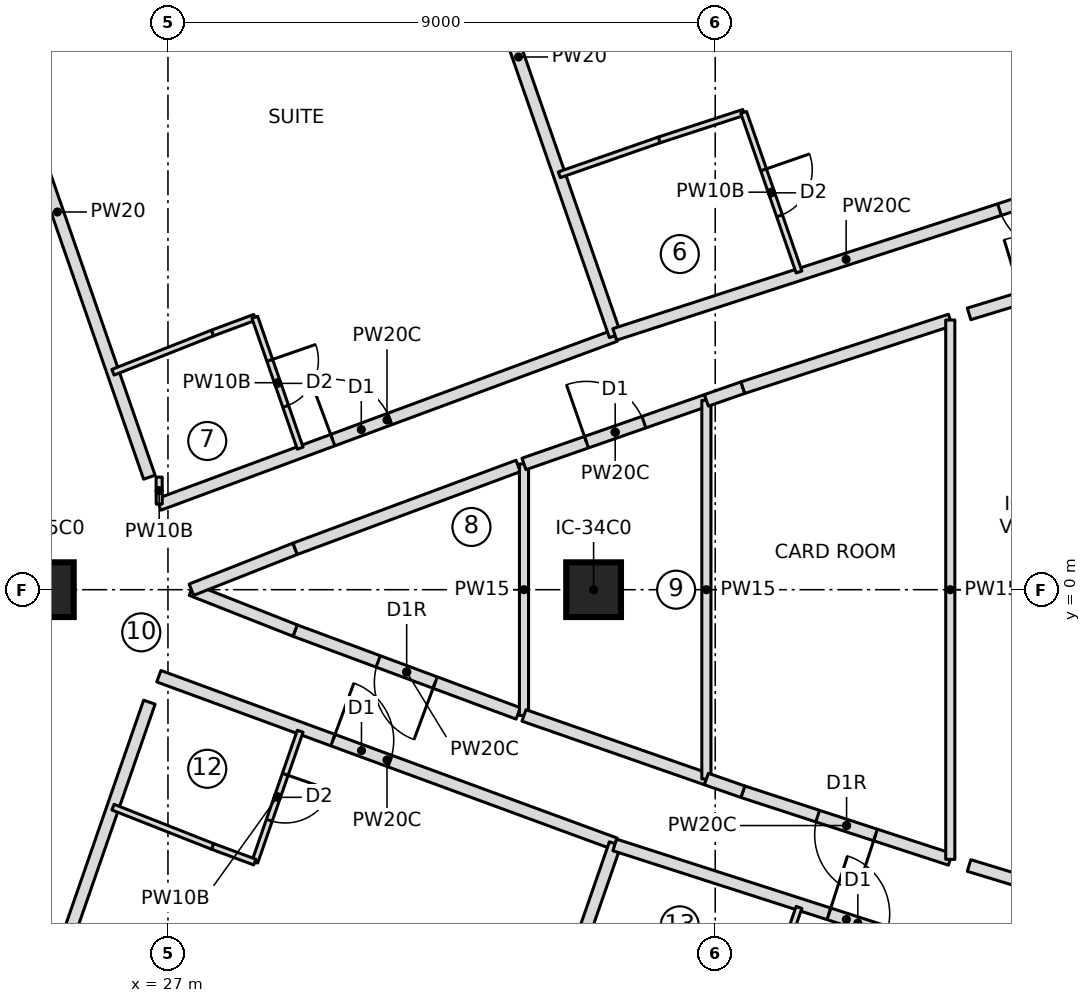
"""IFC4 building model, lengths in metres.
Left out: names, types, materials, properties, quantities, classifications, styles, units other than length and angle.
Written with IfcOpenShell. Run it as: python <this file> out.ifc"""

import sys

from ifc_helpers import new_model, si_unit, direction, frame, frame_2d, origin, origin_2d, place, context, subcontext, project, spatial, rectangle, extrude, element, fill, save


model = new_model("IFC4")
c1 = context("Model", 3, precision=1e-05, world=origin(), true_north=direction((0.0, 1.0)))
c2 = subcontext(c1, "Body", "Model", "MODEL_VIEW")
j1 = project(units=[si_unit("LENGTHUNIT", "METRE"), si_unit("PLANEANGLEUNIT", "RADIAN")], contexts=[c1])
p1 = place(None, origin())
s1 = spatial("IfcSite", under=j1, at=p1, CompositionType="ELEMENT")
p2 = place(p1, origin())
s2 = spatial("IfcBuilding", under=s1, at=p2, CompositionType="ELEMENT")
p3 = place(p2, frame((0.0, 0.0, 299.85)))
s3 = spatial("IfcBuildingStorey", under=s2, at=p3, CompositionType="ELEMENT", Elevation=299.85)
for number, where, z_axis, x_axis in (
    (1, (25.0, 0.0, 0.0), (0.0, 0.0, 1.0), (1.0, 0.0, 0.0)),
    (2, (34.0, 0.0, 0.0), (0.0, 0.0, 1.0), (1.0, 0.0, 0.0)),
):
    element("IfcColumn", number, at=place(p3, frame(where, z_axis=z_axis, x_axis=x_axis)), inside=s3, PredefinedType="COLUMN", context=c2, shape_type="SweptSolid", body=[
        extrude(rectangle(XDim=0.9, YDim=0.9, at=origin_2d()), origin(), (0.0, 0.0, 1.0), 3.55),
    ])
p4 = place(p3, frame((26.694, 1.85, 0.0), z_axis=(0.0, 0.0, 1.0), x_axis=(-0.327714422317, 0.944776829418, 0.0)))
e3 = element("IfcWall", 3, at=p4, inside=s3, PredefinedType="PARTITIONING", context=c2, shape_type="SweptSolid", body=[
    extrude(rectangle(XDim=9.233, YDim=0.2, at=frame_2d((4.617, 0.0))), origin(), (0.0, 0.0, 1.0), 3.15),
])
p5 = place(p3, frame((26.85, 1.401, 0.0), z_axis=(0.0, 0.0, 1.0), x_axis=(0.937815361849, 0.34713447982, 0.0)))
e4 = element("IfcWall", 4, at=p5, inside=s3, PredefinedType="PARTITIONING", context=c2, shape_type="SweptSolid", body=[
    extrude(rectangle(XDim=8.001, YDim=0.2, at=frame_2d((4.001, 0.0))), origin(), (0.0, 0.0, 1.0), 3.15),
])
p6 = place(p5, frame((3.05, 0.0, 0.0)))
e5 = element("IfcOpeningElement", 5, at=p6, cuts=e4, PredefinedType="OPENING", context=c2, shape_type="SweptSolid", body=[
    extrude(rectangle(XDim=1.0, YDim=2.1, at=frame_2d((0.5, 1.05))), frame((0.0, 0.11, 0.0), z_axis=(0.0, -1.0, 0.0), x_axis=(1.0, 0.0, 0.0)), (0.0, 0.0, 1.0), 0.22),
])
p7 = place(p3, frame((26.096, 3.576, 0.0), z_axis=(0.0, 0.0, 1.0), x_axis=(0.930254925629, 0.366913850028, 0.0)))
e6 = element("IfcWall", 6, at=p7, inside=s3, PredefinedType="PARTITIONING", context=c2, shape_type="SweptSolid", body=[
    extrude(rectangle(XDim=1.76, YDim=0.1, at=frame_2d((0.88, 0.0))), origin(), (0.0, 0.0, 1.0), 3.15),
])
p8 = place(p3, frame((27.733, 4.222, 0.0), z_axis=(0.0, 0.0, 1.0), x_axis=(0.937514267289, 0.347946833049, 0.0)))
e7 = element("IfcWall", 7, at=p8, inside=s3, PredefinedType="PARTITIONING", context=c2, shape_type="SweptSolid", body=[
    extrude(rectangle(XDim=0.742, YDim=0.1, at=frame_2d((0.371, 0.0))), origin(), (0.0, 0.0, 1.0), 3.15),
])
p9 = place(p3, frame((28.428, 4.48, 0.0), z_axis=(0.0, 0.0, 1.0), x_axis=(0.327718024288, -0.944775579996, 0.0)))
e8 = element("IfcWall", 8, at=p9, inside=s3, PredefinedType="PARTITIONING", context=c2, shape_type="SweptSolid", body=[
    extrude(rectangle(XDim=2.277, YDim=0.1, at=frame_2d((1.139, 0.0))), origin(), (0.0, 0.0, 1.0), 3.15),
])
p10 = place(p9, frame((0.75, 0.0, 0.0)))
e9 = element("IfcOpeningElement", 9, at=p10, cuts=e8, PredefinedType="OPENING", context=c2, shape_type="SweptSolid", body=[
    extrude(rectangle(XDim=0.8, YDim=2.1, at=frame_2d((0.4, 1.05))), frame((0.0, 0.06, 0.0), z_axis=(0.0, -1.0, 0.0), x_axis=(1.0, 0.0, 0.0)), (0.0, 0.0, 1.0), 0.12),
])
p11 = place(p3, frame((34.354, 4.179, 0.0), z_axis=(0.0, 0.0, 1.0), x_axis=(-0.327696596093, 0.944783012606, 0.0)))
e10 = element("IfcWall", 10, at=p11, inside=s3, PredefinedType="PARTITIONING", context=c2, shape_type="SweptSolid", body=[
    extrude(rectangle(XDim=9.7, YDim=0.2, at=frame_2d((4.85, 0.0))), origin(), (0.0, 0.0, 1.0), 3.15),
])
p12 = place(p3, frame((41.958, 6.667, 0.0), z_axis=(0.0, 0.0, 1.0), x_axis=(-0.95118530316, -0.308620347761, 0.0)))
e11 = element("IfcWall", 11, at=p12, inside=s3, PredefinedType="PARTITIONING", context=c2, shape_type="SweptSolid", body=[
    extrude(rectangle(XDim=8.002, YDim=0.2, at=frame_2d((4.001, 0.0))), origin(), (0.0, 0.0, 1.0), 3.15),
])
p13 = place(p12, frame((0.35, 0.0, 0.0)))
e12 = element("IfcOpeningElement", 12, at=p13, cuts=e11, PredefinedType="OPENING", context=c2, shape_type="SweptSolid", body=[
    extrude(rectangle(XDim=1.0, YDim=2.1, at=frame_2d((0.5, 1.05))), frame((0.0, 0.11, 0.0), z_axis=(0.0, -1.0, 0.0), x_axis=(1.0, 0.0, 0.0)), (0.0, 0.0, 1.0), 0.22),
])
p14 = place(p3, frame((33.437, 6.824, 0.0), z_axis=(0.0, 0.0, 1.0), x_axis=(0.944260018318, 0.329200573825, 0.0)))
e13 = element("IfcWall", 13, at=p14, inside=s3, PredefinedType="PARTITIONING", context=c2, shape_type="SweptSolid", body=[
    extrude(rectangle(XDim=1.74, YDim=0.1, at=frame_2d((0.87, 0.0))), origin(), (0.0, 0.0, 1.0), 3.15),
])
p15 = place(p3, frame((35.08, 7.397, 0.0), z_axis=(0.0, 0.0, 1.0), x_axis=(0.95070411494, 0.310099477322, 0.0)))
e14 = element("IfcWall", 14, at=p15, inside=s3, PredefinedType="PARTITIONING", context=c2, shape_type="SweptSolid", body=[
    extrude(rectangle(XDim=1.46, YDim=0.1, at=frame_2d((0.73, 0.0))), origin(), (0.0, 0.0, 1.0), 3.15),
])
p16 = place(p3, frame((36.468, 7.85, 0.0), z_axis=(0.0, 0.0, 1.0), x_axis=(0.327702248101, -0.944781052197, 0.0)))
e15 = element("IfcWall", 15, at=p16, inside=s3, PredefinedType="PARTITIONING", context=c2, shape_type="SweptSolid", body=[
    extrude(rectangle(XDim=2.777, YDim=0.1, at=frame_2d((1.389, 0.0))), origin(), (0.0, 0.0, 1.0), 3.15),
])
p17 = place(p16, frame((1.0, 0.0, 0.0)))
e16 = element("IfcOpeningElement", 16, at=p17, cuts=e15, PredefinedType="OPENING", context=c2, shape_type="SweptSolid", body=[
    extrude(rectangle(XDim=0.8, YDim=2.1, at=frame_2d((0.4, 1.05))), frame((0.0, 0.06, 0.0), z_axis=(0.0, -1.0, 0.0), x_axis=(1.0, 0.0, 0.0)), (0.0, 0.0, 1.0), 0.12),
])
p18 = place(p3, frame((41.965, 6.648, 0.0), z_axis=(0.0, 0.0, 1.0), x_axis=(-0.327710853631, 0.944778067279, 0.0)))
e17 = element("IfcWall", 17, at=p18, inside=s3, PredefinedType="PARTITIONING", context=c2, shape_type="SweptSolid", body=[
    extrude(rectangle(XDim=9.707, YDim=0.2, at=frame_2d((4.854, 0.0))), origin(), (0.0, 0.0, 1.0), 3.15),
])
p19 = place(p3, frame((23.668, -10.573, 0.0), z_axis=(0.0, 0.0, 1.0), x_axis=(0.327714422317, 0.944776829418, 0.0)))
e18 = element("IfcWall", 18, at=p19, inside=s3, PredefinedType="PARTITIONING", context=c2, shape_type="SweptSolid", body=[
    extrude(rectangle(XDim=9.233, YDim=0.2, at=frame_2d((4.617, 0.0))), origin(), (0.0, 0.0, 1.0), 3.15),
])
p20 = place(p3, frame((26.85, -1.423, 0.0), z_axis=(0.0, 0.0, 1.0), x_axis=(0.938687309179, -0.344769684843, 0.0)))
e19 = element("IfcWall", 19, at=p20, inside=s3, PredefinedType="PARTITIONING", context=c2, shape_type="SweptSolid", body=[
    extrude(rectangle(XDim=7.994, YDim=0.2, at=frame_2d((3.997, 0.0))), origin(), (0.0, 0.0, 1.0), 3.15),
])
p21 = place(p20, frame((3.05, 0.0, 0.0)))
e20 = element("IfcOpeningElement", 20, at=p21, cuts=e19, PredefinedType="OPENING", context=c2, shape_type="SweptSolid", body=[
    extrude(rectangle(XDim=1.0, YDim=2.1, at=frame_2d((0.5, 1.05))), frame((0.0, 0.11, 0.0), z_axis=(0.0, -1.0, 0.0), x_axis=(1.0, 0.0, 0.0)), (0.0, 0.0, 1.0), 0.22),
])
p22 = place(p3, frame((29.175, -2.328, 0.0), z_axis=(0.0, 0.0, 1.0), x_axis=(-0.327718024288, -0.944775579996, 0.0)))
e21 = element("IfcWall", 21, at=p22, inside=s3, PredefinedType="PARTITIONING", context=c2, shape_type="SweptSolid", body=[
    extrude(rectangle(XDim=2.277, YDim=0.1, at=frame_2d((1.139, 0.0))), origin(), (0.0, 0.0, 1.0), 3.15),
])
p23 = place(p22, frame((0.75, 0.0, 0.0)))
e22 = element("IfcOpeningElement", 22, at=p23, cuts=e21, PredefinedType="OPENING", context=c2, shape_type="SweptSolid", body=[
    extrude(rectangle(XDim=0.8, YDim=2.1, at=frame_2d((0.4, 1.05))), frame((0.0, 0.06, 0.0), z_axis=(0.0, -1.0, 0.0), x_axis=(1.0, 0.0, 0.0)), (0.0, 0.0, 1.0), 0.12),
])
p24 = place(p3, frame((28.428, -4.48, 0.0), z_axis=(0.0, 0.0, 1.0), x_axis=(-0.937514267289, 0.347946833049, 0.0)))
e23 = element("IfcWall", 23, at=p24, inside=s3, PredefinedType="PARTITIONING", context=c2, shape_type="SweptSolid", body=[
    extrude(rectangle(XDim=0.742, YDim=0.1, at=frame_2d((0.371, 0.0))), origin(), (0.0, 0.0, 1.0), 3.15),
])
p25 = place(p3, frame((27.733, -4.222, 0.0), z_axis=(0.0, 0.0, 1.0), x_axis=(-0.930254925629, 0.366913850028, 0.0)))
e24 = element("IfcWall", 24, at=p25, inside=s3, PredefinedType="PARTITIONING", context=c2, shape_type="SweptSolid", body=[
    extrude(rectangle(XDim=1.76, YDim=0.1, at=frame_2d((0.88, 0.0))), origin(), (0.0, 0.0, 1.0), 3.15),
])
p26 = place(p3, frame((31.175, -13.344, 0.0), z_axis=(0.0, 0.0, 1.0), x_axis=(0.327696596093, 0.944783012606, 0.0)))
e25 = element("IfcWall", 25, at=p26, inside=s3, PredefinedType="PARTITIONING", context=c2, shape_type="SweptSolid", body=[
    extrude(rectangle(XDim=9.7, YDim=0.2, at=frame_2d((4.85, 0.0))), origin(), (0.0, 0.0, 1.0), 3.15),
])
p27 = place(p3, frame((34.347, -4.198, 0.0), z_axis=(0.0, 0.0, 1.0), x_axis=(0.951959334907, -0.306224467805, 0.0)))
e26 = element("IfcWall", 26, at=p27, inside=s3, PredefinedType="PARTITIONING", context=c2, shape_type="SweptSolid", body=[
    extrude(rectangle(XDim=8.002, YDim=0.2, at=frame_2d((4.001, 0.0))), origin(), (0.0, 0.0, 1.0), 3.15),
])
p28 = place(p27, frame((3.7, 0.0, 0.0)))
e27 = element("IfcOpeningElement", 27, at=p28, cuts=e26, PredefinedType="OPENING", context=c2, shape_type="SweptSolid", body=[
    extrude(rectangle(XDim=1.0, YDim=2.1, at=frame_2d((0.5, 1.05))), frame((0.0, 0.11, 0.0), z_axis=(0.0, -1.0, 0.0), x_axis=(1.0, 0.0, 0.0)), (0.0, 0.0, 1.0), 0.22),
])
p29 = place(p3, frame((37.378, -5.226, 0.0), z_axis=(0.0, 0.0, 1.0), x_axis=(-0.327702248101, -0.944781052197, 0.0)))
e28 = element("IfcWall", 28, at=p29, inside=s3, PredefinedType="PARTITIONING", context=c2, shape_type="SweptSolid", body=[
    extrude(rectangle(XDim=2.777, YDim=0.1, at=frame_2d((1.389, 0.0))), origin(), (0.0, 0.0, 1.0), 3.15),
])
p30 = place(p29, frame((1.0, 0.0, 0.0)))
e29 = element("IfcOpeningElement", 29, at=p30, cuts=e28, PredefinedType="OPENING", context=c2, shape_type="SweptSolid", body=[
    extrude(rectangle(XDim=0.8, YDim=2.1, at=frame_2d((0.4, 1.05))), frame((0.0, 0.06, 0.0), z_axis=(0.0, -1.0, 0.0), x_axis=(1.0, 0.0, 0.0)), (0.0, 0.0, 1.0), 0.12),
])
p31 = place(p3, frame((32.76, -2.035, 0.0), z_axis=(0.0, 0.0, 1.0), x_axis=(-0.937460178932, 0.348092534992, 0.0)))
e30 = element("IfcWall", 30, at=p31, inside=s3, PredefinedType="PARTITIONING", context=c2, shape_type="SweptSolid", body=[
    extrude(rectangle(XDim=3.913, YDim=0.2, at=frame_2d((1.957, 0.0))), origin(), (0.0, 0.0, 1.0), 3.15),
])
p32 = place(p31, frame((1.457, 0.0, 0.0)))
e31 = element("IfcOpeningElement", 31, at=p32, cuts=e30, PredefinedType="OPENING", context=c2, shape_type="SweptSolid", body=[
    extrude(rectangle(XDim=1.0, YDim=2.1, at=frame_2d((0.5, 1.05))), frame((0.0, 0.11, 0.0), z_axis=(0.0, -1.0, 0.0), x_axis=(1.0, 0.0, 0.0)), (0.0, 0.0, 1.0), 0.22),
])
for number, where, z_axis, x_axis in (
    (32, (29.092, -0.673, 0.0), (0.0, 0.0, 1.0), (-0.93, 0.367, 0.0)),
    (33, (27.385, 0.0, 0.0), (0.0, 0.0, 1.0), (0.93, 0.367, 0.0)),
):
    element("IfcWall", number, at=place(p3, frame(where, z_axis=z_axis, x_axis=x_axis)), inside=s3, PredefinedType="PARTITIONING", context=c2, shape_type="SweptSolid", body=[
        extrude(rectangle(XDim=1.834, YDim=0.2, at=frame_2d((0.917, 0.0))), origin(), (0.0, 0.0, 1.0), 3.15),
    ])
p33 = place(p3, frame((29.092, 0.673, 0.0), z_axis=(0.0, 0.0, 1.0), x_axis=(0.937460178932, 0.348092534992, 0.0)))
e34 = element("IfcWall", 34, at=p33, inside=s3, PredefinedType="PARTITIONING", context=c2, shape_type="SweptSolid", body=[
    extrude(rectangle(XDim=3.913, YDim=0.2, at=frame_2d((1.957, 0.0))), origin(), (0.0, 0.0, 1.0), 3.15),
])
p34 = place(p3, frame((32.855, -2.068, 0.0), z_axis=(0.0, 0.0, 1.0), x_axis=(0.0, 1.0, 0.0)))
e35 = element("IfcWall", 35, at=p34, inside=s3, PredefinedType="PARTITIONING", context=c2, shape_type="SweptSolid", body=[
    extrude(rectangle(XDim=4.136, YDim=0.15, at=frame_2d((2.068, 0.0))), origin(), (0.0, 0.0, 1.0), 3.15),
])
p35 = place(p3, frame((32.855, 2.068, 0.0), z_axis=(0.0, 0.0, 1.0), x_axis=(0.944260188635, 0.329200085296, 0.0)))
e36 = element("IfcWall", 36, at=p35, inside=s3, PredefinedType="PARTITIONING", context=c2, shape_type="SweptSolid", body=[
    extrude(rectangle(XDim=3.177, YDim=0.2, at=frame_2d((1.588, 0.0))), origin(), (0.0, 0.0, 1.0), 3.15),
])
p36 = place(p35, frame((1.088, 0.0, 0.0)))
e37 = element("IfcOpeningElement", 37, at=p36, cuts=e36, PredefinedType="OPENING", context=c2, shape_type="SweptSolid", body=[
    extrude(rectangle(XDim=1.0, YDim=2.1, at=frame_2d((0.5, 1.05))), frame((0.0, 0.11, 0.0), z_axis=(0.0, -1.0, 0.0), x_axis=(1.0, 0.0, 0.0)), (0.0, 0.0, 1.0), 0.22),
])
p37 = place(p3, frame((35.855, -3.114, 0.0), z_axis=(0.0, 0.0, 1.0), x_axis=(-0.944260188635, 0.329200085296, 0.0)))
e38 = element("IfcWall", 38, at=p37, inside=s3, PredefinedType="PARTITIONING", context=c2, shape_type="SweptSolid", body=[
    extrude(rectangle(XDim=3.177, YDim=0.2, at=frame_2d((1.588, 0.0))), origin(), (0.0, 0.0, 1.0), 3.15),
])
p38 = place(p3, frame((35.855, -3.114, 0.0), z_axis=(0.0, 0.0, 1.0), x_axis=(0.0, 1.0, 0.0)))
e39 = element("IfcWall", 39, at=p38, inside=s3, PredefinedType="PARTITIONING", context=c2, shape_type="SweptSolid", body=[
    extrude(rectangle(XDim=6.228, YDim=0.15, at=frame_2d((3.114, 0.0))), origin(), (0.0, 0.0, 1.0), 3.15),
])
p39 = place(p3, frame((39.866, -4.435, 0.0), z_axis=(0.0, 0.0, 1.0), x_axis=(-0.950718067733, 0.310056697535, 0.0)))
e40 = element("IfcWall", 40, at=p39, inside=s3, PredefinedType="PARTITIONING", context=c2, shape_type="SweptSolid", body=[
    extrude(rectangle(XDim=3.588, YDim=0.2, at=frame_2d((1.794, 0.0))), origin(), (0.0, 0.0, 1.0), 3.15),
])
p40 = place(p39, frame((1.294, 0.0, 0.0)))
e41 = element("IfcOpeningElement", 41, at=p40, cuts=e40, PredefinedType="OPENING", context=c2, shape_type="SweptSolid", body=[
    extrude(rectangle(XDim=1.0, YDim=2.1, at=frame_2d((0.5, 1.05))), frame((0.0, 0.11, 0.0), z_axis=(0.0, -1.0, 0.0), x_axis=(1.0, 0.0, 0.0)), (0.0, 0.0, 1.0), 0.22),
])
for number, where, z_axis, x_axis in (
    (42, (36.455, -3.323, 0.0), (0.0, 0.0, 1.0), (-0.944, 0.329, 0.0)),
    (43, (35.855, 3.114, 0.0), (0.0, 0.0, 1.0), (0.944, 0.329, 0.0)),
):
    element("IfcWall", number, at=place(p3, frame(where, z_axis=z_axis, x_axis=x_axis)), inside=s3, PredefinedType="PARTITIONING", context=c2, shape_type="SweptSolid", body=[
        extrude(rectangle(XDim=0.635, YDim=0.2, at=frame_2d((0.317, 0.0))), origin(), (0.0, 0.0, 1.0), 3.15),
    ])
p41 = place(p3, frame((36.455, 3.323, 0.0), z_axis=(0.0, 0.0, 1.0), x_axis=(0.950718067733, 0.310056697535, 0.0)))
e44 = element("IfcWall", 44, at=p41, inside=s3, PredefinedType="PARTITIONING", context=c2, shape_type="SweptSolid", body=[
    extrude(rectangle(XDim=3.588, YDim=0.2, at=frame_2d((1.794, 0.0))), origin(), (0.0, 0.0, 1.0), 3.15),
])
p42 = place(p3, frame((39.866, -4.435, 0.0), z_axis=(0.0, 0.0, 1.0), x_axis=(0.0, 1.0, 0.0)))
e45 = element("IfcWall", 45, at=p42, inside=s3, PredefinedType="PARTITIONING", context=c2, shape_type="SweptSolid", body=[
    extrude(rectangle(XDim=8.871, YDim=0.15, at=frame_2d((4.435, 0.0))), origin(), (0.0, 0.0, 1.0), 3.15),
])
p43 = place(p3, frame((40.175, 4.536, 0.0), z_axis=(0.0, 0.0, 1.0), x_axis=(0.956742178936, 0.290937111838, 0.0)))
e46 = element("IfcWall", 46, at=p43, inside=s3, PredefinedType="PARTITIONING", context=c2, shape_type="SweptSolid", body=[
    extrude(rectangle(XDim=2.813, YDim=0.2, at=frame_2d((1.406, 0.0))), origin(), (0.0, 0.0, 1.0), 3.15),
])
p44 = place(p43, frame((0.906, 0.0, 0.0)))
e47 = element("IfcOpeningElement", 47, at=p44, cuts=e46, PredefinedType="OPENING", context=c2, shape_type="SweptSolid", body=[
    extrude(rectangle(XDim=1.0, YDim=2.1, at=frame_2d((0.5, 1.05))), frame((0.0, 0.11, 0.0), z_axis=(0.0, -1.0, 0.0), x_axis=(1.0, 0.0, 0.0)), (0.0, 0.0, 1.0), 0.22),
])
p45 = place(p3, frame((42.866, -5.354, 0.0), z_axis=(0.0, 0.0, 1.0), x_axis=(-0.956742178936, 0.290937111838, 0.0)))
e48 = element("IfcWall", 48, at=p45, inside=s3, PredefinedType="PARTITIONING", context=c2, shape_type="SweptSolid", body=[
    extrude(rectangle(XDim=2.813, YDim=0.2, at=frame_2d((1.406, 0.0))), origin(), (0.0, 0.0, 1.0), 3.15),
])
p46 = place(p3, frame((26.856, 1.409, 0.0), z_axis=(0.0, 0.0, 1.0), x_axis=(-0.003863105832, 0.999992538179, 0.0)))
e49 = element("IfcWall", 49, at=p46, inside=s3, PredefinedType="PARTITIONING", context=c2, shape_type="SweptSolid", body=[
    extrude(rectangle(XDim=0.442, YDim=0.1, at=frame_2d((0.221, 0.0))), origin(), (0.0, 0.0, 1.0), 3.15),
])
p47 = place(p10, origin())
e50 = element("IfcDoor", 50, at=p47, inside=s3, OperationType="SINGLE_SWING_LEFT", PredefinedType="DOOR", context=c2, shape_type="SweptSolid", body=[
    extrude(rectangle(XDim=0.8, YDim=2.1, at=frame_2d((0.4, 1.05))), frame((0.0, 0.025, 0.0), z_axis=(0.0, -1.0, 0.0), x_axis=(1.0, 0.0, 0.0)), (0.0, 0.0, 1.0), 0.05),
])
fill(e9, e50)
p48 = place(p6, origin())
e51 = element("IfcDoor", 51, at=p48, inside=s3, OperationType="SINGLE_SWING_LEFT", PredefinedType="DOOR", context=c2, shape_type="SweptSolid", body=[
    extrude(rectangle(XDim=1.0, YDim=2.1, at=frame_2d((0.5, 1.05))), frame((0.0, 0.025, 0.0), z_axis=(0.0, -1.0, 0.0), x_axis=(1.0, 0.0, 0.0)), (0.0, 0.0, 1.0), 0.05),
])
fill(e5, e51)
p49 = place(p17, origin())
e52 = element("IfcDoor", 52, at=p49, inside=s3, OperationType="SINGLE_SWING_LEFT", PredefinedType="DOOR", context=c2, shape_type="SweptSolid", body=[
    extrude(rectangle(XDim=0.8, YDim=2.1, at=frame_2d((0.4, 1.05))), frame((0.0, 0.025, 0.0), z_axis=(0.0, -1.0, 0.0), x_axis=(1.0, 0.0, 0.0)), (0.0, 0.0, 1.0), 0.05),
])
fill(e16, e52)
p50 = place(p13, origin())
e53 = element("IfcDoor", 53, at=p50, inside=s3, OperationType="SINGLE_SWING_LEFT", PredefinedType="DOOR", context=c2, shape_type="SweptSolid", body=[
    extrude(rectangle(XDim=1.0, YDim=2.1, at=frame_2d((0.5, 1.05))), frame((0.0, 0.025, 0.0), z_axis=(0.0, -1.0, 0.0), x_axis=(1.0, 0.0, 0.0)), (0.0, 0.0, 1.0), 0.05),
])
fill(e12, e53)
p51 = place(p23, origin())
e54 = element("IfcDoor", 54, at=p51, inside=s3, OperationType="SINGLE_SWING_LEFT", PredefinedType="DOOR", context=c2, shape_type="SweptSolid", body=[
    extrude(rectangle(XDim=0.8, YDim=2.1, at=frame_2d((0.4, 1.05))), frame((0.0, 0.025, 0.0), z_axis=(0.0, -1.0, 0.0), x_axis=(1.0, 0.0, 0.0)), (0.0, 0.0, 1.0), 0.05),
])
fill(e22, e54)
p52 = place(p21, origin())
e55 = element("IfcDoor", 55, at=p52, inside=s3, OperationType="SINGLE_SWING_LEFT", PredefinedType="DOOR", context=c2, shape_type="SweptSolid", body=[
    extrude(rectangle(XDim=1.0, YDim=2.1, at=frame_2d((0.5, 1.05))), frame((0.0, 0.025, 0.0), z_axis=(0.0, -1.0, 0.0), x_axis=(1.0, 0.0, 0.0)), (0.0, 0.0, 1.0), 0.05),
])
fill(e20, e55)
p53 = place(p28, origin())
e56 = element("IfcDoor", 56, at=p53, inside=s3, OperationType="SINGLE_SWING_LEFT", PredefinedType="DOOR", context=c2, shape_type="SweptSolid", body=[
    extrude(rectangle(XDim=1.0, YDim=2.1, at=frame_2d((0.5, 1.05))), frame((0.0, 0.025, 0.0), z_axis=(0.0, -1.0, 0.0), x_axis=(1.0, 0.0, 0.0)), (0.0, 0.0, 1.0), 0.05),
])
fill(e27, e56)
p54 = place(p32, origin())
e57 = element("IfcDoor", 57, at=p54, inside=s3, OperationType="SINGLE_SWING_RIGHT", PredefinedType="DOOR", context=c2, shape_type="SweptSolid", body=[
    extrude(rectangle(XDim=1.0, YDim=2.1, at=frame_2d((0.5, 1.05))), frame((0.0, 0.025, 0.0), z_axis=(0.0, -1.0, 0.0), x_axis=(1.0, 0.0, 0.0)), (0.0, 0.0, 1.0), 0.05),
])
fill(e31, e57)
p55 = place(p36, origin())
e58 = element("IfcDoor", 58, at=p55, inside=s3, OperationType="SINGLE_SWING_LEFT", PredefinedType="DOOR", context=c2, shape_type="SweptSolid", body=[
    extrude(rectangle(XDim=1.0, YDim=2.1, at=frame_2d((0.5, 1.05))), frame((0.0, 0.025, 0.0), z_axis=(0.0, -1.0, 0.0), x_axis=(1.0, 0.0, 0.0)), (0.0, 0.0, 1.0), 0.05),
])
fill(e37, e58)
p56 = place(p40, origin())
e59 = element("IfcDoor", 59, at=p56, inside=s3, OperationType="SINGLE_SWING_RIGHT", PredefinedType="DOOR", context=c2, shape_type="SweptSolid", body=[
    extrude(rectangle(XDim=1.0, YDim=2.1, at=frame_2d((0.5, 1.05))), frame((0.0, 0.025, 0.0), z_axis=(0.0, -1.0, 0.0), x_axis=(1.0, 0.0, 0.0)), (0.0, 0.0, 1.0), 0.05),
])
fill(e41, e59)
save(model, sys.argv[1])
